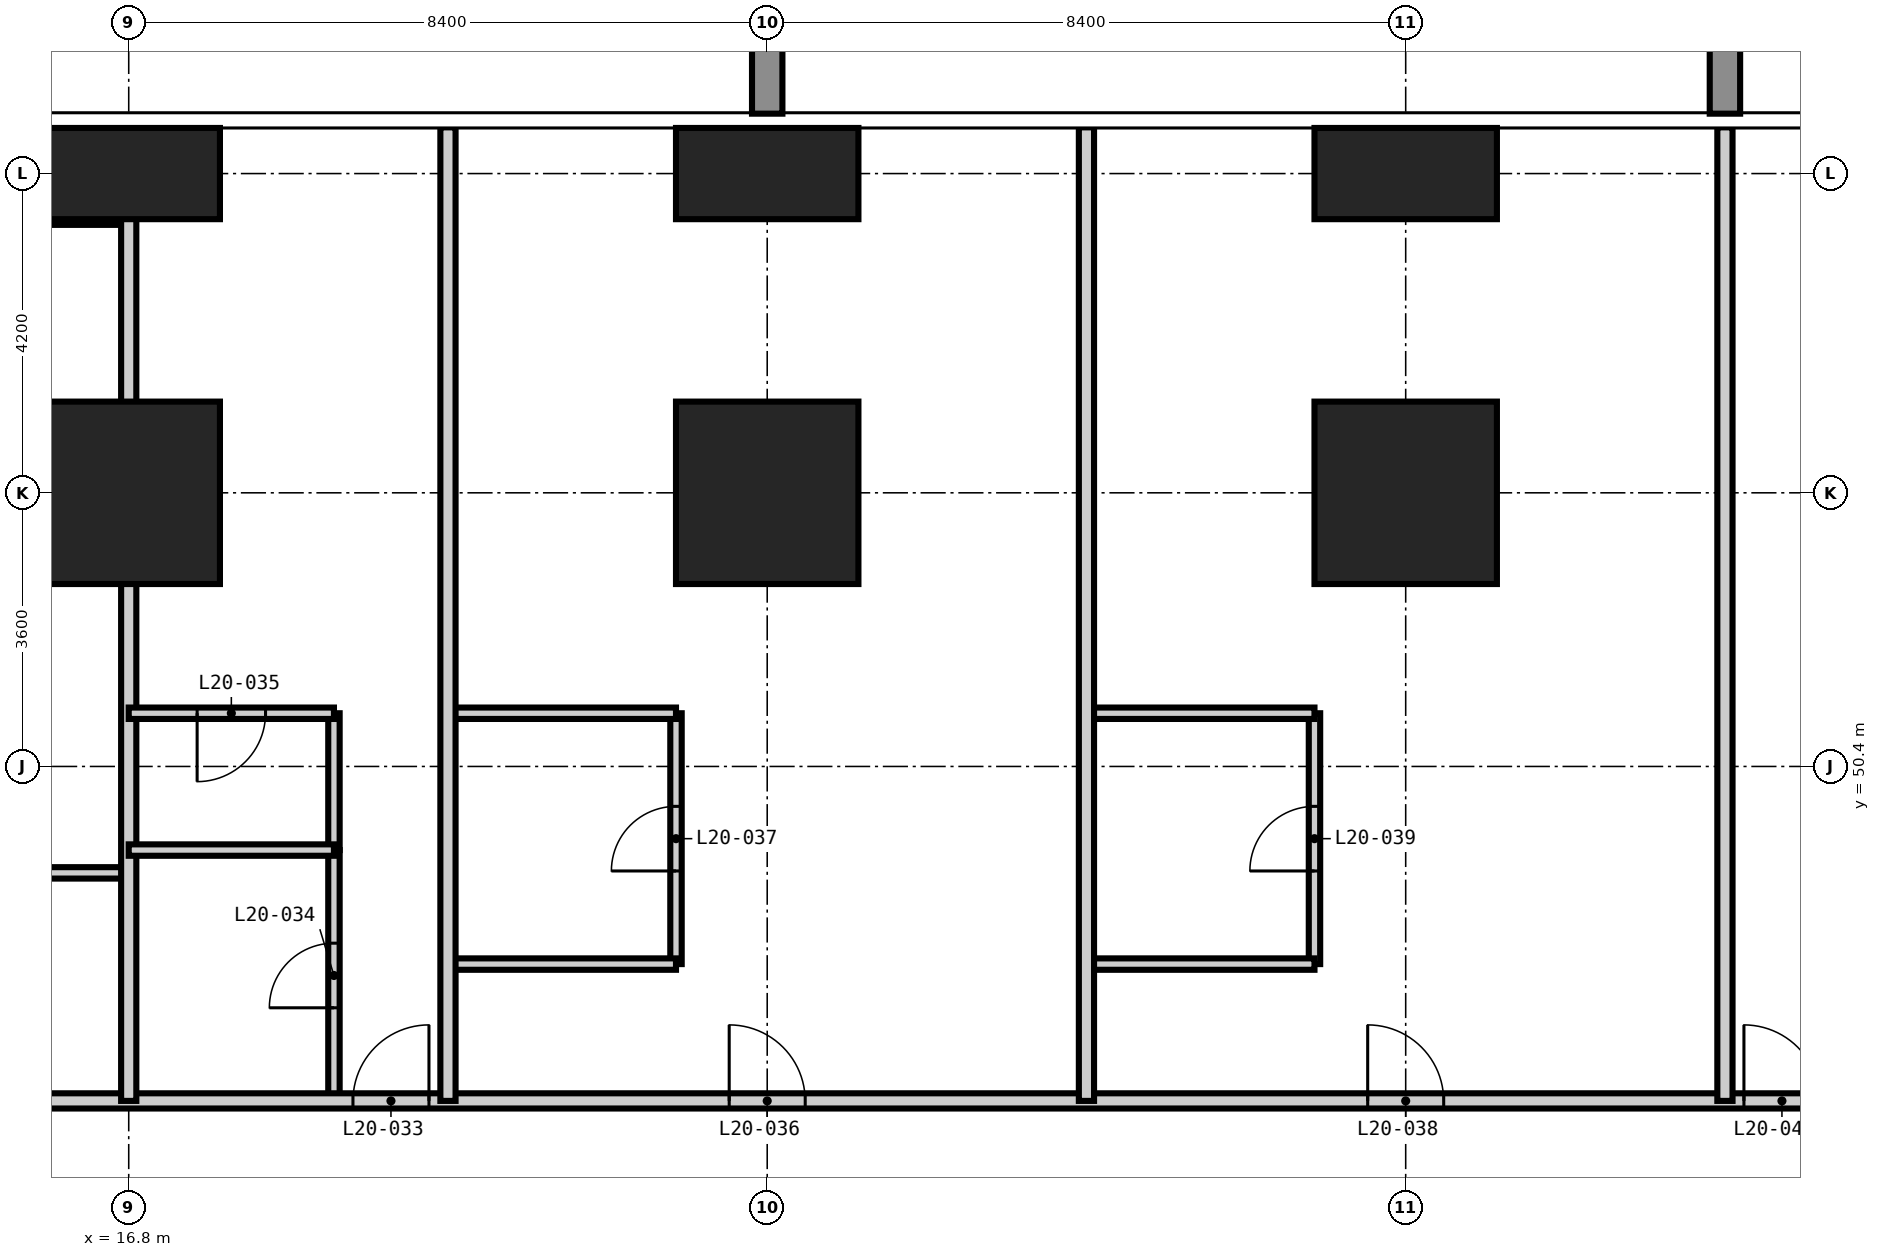
"""IFC4 building model, lengths in metres.
Left out: names, types, materials, properties, quantities, classifications, styles, units other than length and angle.
Written with IfcOpenShell. Run it as: python <this file> out.ifc"""

import sys

from ifc_helpers import new_model, si_unit, direction, frame, frame_2d, origin, origin_2d, place, context, subcontext, project, spatial, rectangle, extrude, element, fill, save


model = new_model("IFC4")
c1 = context("Model", 3, precision=1e-05, world=origin(), true_north=direction((0.0, 1.0)))
c2 = subcontext(c1, "Body", "Model", "MODEL_VIEW")
j1 = project(units=[si_unit("LENGTHUNIT", "METRE"), si_unit("PLANEANGLEUNIT", "RADIAN")], contexts=[c1])
p1 = place(None, origin())
s1 = spatial("IfcSite", under=j1, at=p1, CompositionType="ELEMENT")
p2 = place(p1, origin())
s2 = spatial("IfcBuilding", under=s1, at=p2, CompositionType="ELEMENT")
p3 = place(p2, frame((0.0, 0.0, 81.0)))
s3 = spatial("IfcBuildingStorey", under=s2, at=p3, CompositionType="ELEMENT", Elevation=81.0)
p4 = place(p3, frame((16.8, 54.0, -0.35), z_axis=(0.0, 0.0, 1.0), x_axis=(1.0, 0.0, 0.0)))
e1 = element("IfcColumn", 1, at=p4, inside=s3, PredefinedType="COLUMN", context=c2, shape_type="SweptSolid", body=[
    extrude(rectangle(XDim=2.4, YDim=2.4, at=origin_2d()), origin(), (0.0, 0.0, 1.0), 3.6),
])
p5 = place(p3, frame((16.8, 58.2, -0.35), z_axis=(0.0, 0.0, 1.0), x_axis=(1.0, 0.0, 0.0)))
e2 = element("IfcColumn", 2, at=p5, inside=s3, PredefinedType="COLUMN", context=c2, shape_type="SweptSolid", body=[
    extrude(rectangle(XDim=2.4, YDim=1.2, at=origin_2d()), origin(), (0.0, 0.0, 1.0), 3.6),
])
p6 = place(p3, frame((25.2, 54.0, -0.35), z_axis=(0.0, 0.0, 1.0), x_axis=(1.0, 0.0, 0.0)))
e3 = element("IfcColumn", 3, at=p6, inside=s3, PredefinedType="COLUMN", context=c2, shape_type="SweptSolid", body=[
    extrude(rectangle(XDim=2.4, YDim=2.4, at=origin_2d()), origin(), (0.0, 0.0, 1.0), 3.6),
])
p7 = place(p3, frame((25.2, 58.2, -0.35), z_axis=(0.0, 0.0, 1.0), x_axis=(1.0, 0.0, 0.0)))
e4 = element("IfcColumn", 4, at=p7, inside=s3, PredefinedType="COLUMN", context=c2, shape_type="SweptSolid", body=[
    extrude(rectangle(XDim=2.4, YDim=1.2, at=origin_2d()), origin(), (0.0, 0.0, 1.0), 3.6),
])
p8 = place(p3, frame((33.6, 54.0, -0.35), z_axis=(0.0, 0.0, 1.0), x_axis=(1.0, 0.0, 0.0)))
e5 = element("IfcColumn", 5, at=p8, inside=s3, PredefinedType="COLUMN", context=c2, shape_type="SweptSolid", body=[
    extrude(rectangle(XDim=2.4, YDim=2.4, at=origin_2d()), origin(), (0.0, 0.0, 1.0), 3.6),
])
p9 = place(p3, frame((33.6, 58.2, -0.35), z_axis=(0.0, 0.0, 1.0), x_axis=(1.0, 0.0, 0.0)))
e6 = element("IfcColumn", 6, at=p9, inside=s3, PredefinedType="COLUMN", context=c2, shape_type="SweptSolid", body=[
    extrude(rectangle(XDim=2.4, YDim=1.2, at=origin_2d()), origin(), (0.0, 0.0, 1.0), 3.6),
])
p10 = place(p3, frame((19.5, 46.0, 0.0), z_axis=(0.0, 0.0, 1.0), x_axis=(0.0, 1.0, 0.0)))
e7 = element("IfcWall", 7, at=p10, inside=s3, PredefinedType="PARTITIONING", context=c2, shape_type="SweptSolid", body=[
    extrude(rectangle(XDim=3.3, YDim=0.15, at=frame_2d((1.65, 0.0))), origin(), (0.0, 0.0, 1.0), 3.25),
])
p11 = place(p10, frame((1.225, 0.0, 0.0)))
e8 = element("IfcOpeningElement", 8, at=p11, cuts=e7, PredefinedType="OPENING", context=c2, shape_type="SweptSolid", body=[
    extrude(rectangle(XDim=0.85, YDim=2.1, at=frame_2d((0.425, 1.05))), frame((0.0, 0.085, 0.0), z_axis=(0.0, -1.0, 0.0), x_axis=(1.0, 0.0, 0.0)), (0.0, 0.0, 1.0), 0.17),
])
p12 = place(p3, frame((24.0, 47.8, 0.0), z_axis=(0.0, 0.0, 1.0), x_axis=(0.0, 1.0, 0.0)))
e9 = element("IfcWall", 9, at=p12, inside=s3, PredefinedType="PARTITIONING", context=c2, shape_type="SweptSolid", body=[
    extrude(rectangle(XDim=3.3, YDim=0.15, at=frame_2d((1.65, 0.0))), origin(), (0.0, 0.0, 1.0), 3.25),
])
p13 = place(p12, frame((1.225, 0.0, 0.0)))
e10 = element("IfcOpeningElement", 10, at=p13, cuts=e9, PredefinedType="OPENING", context=c2, shape_type="SweptSolid", body=[
    extrude(rectangle(XDim=0.85, YDim=2.1, at=frame_2d((0.425, 1.05))), frame((0.0, 0.085, 0.0), z_axis=(0.0, -1.0, 0.0), x_axis=(1.0, 0.0, 0.0)), (0.0, 0.0, 1.0), 0.17),
])
p14 = place(p3, frame((32.4, 47.8, 0.0), z_axis=(0.0, 0.0, 1.0), x_axis=(0.0, 1.0, 0.0)))
e11 = element("IfcWall", 11, at=p14, inside=s3, PredefinedType="PARTITIONING", context=c2, shape_type="SweptSolid", body=[
    extrude(rectangle(XDim=3.3, YDim=0.15, at=frame_2d((1.65, 0.0))), origin(), (0.0, 0.0, 1.0), 3.25),
])
p15 = place(p14, frame((1.225, 0.0, 0.0)))
e12 = element("IfcOpeningElement", 12, at=p15, cuts=e11, PredefinedType="OPENING", context=c2, shape_type="SweptSolid", body=[
    extrude(rectangle(XDim=0.85, YDim=2.1, at=frame_2d((0.425, 1.05))), frame((0.0, 0.085, 0.0), z_axis=(0.0, -1.0, 0.0), x_axis=(1.0, 0.0, 0.0)), (0.0, 0.0, 1.0), 0.17),
])
for number, where, z_axis, x_axis in (
    (13, (21.0, 47.8, 0.0), (0.0, 0.0, 1.0), (1.0, 0.0, 0.0)),
    (14, (29.4, 47.8, 0.0), (0.0, 0.0, 1.0), (1.0, 0.0, 0.0)),
):
    element("IfcWall", number, at=place(p3, frame(where, z_axis=z_axis, x_axis=x_axis)), inside=s3, PredefinedType="PARTITIONING", context=c2, shape_type="SweptSolid", body=[
        extrude(rectangle(XDim=3.0, YDim=0.15, at=frame_2d((1.5, 0.0))), origin(), (0.0, 0.0, 1.0), 3.25),
    ])
p16 = place(p3, frame((14.0, 49.0, 0.0), z_axis=(0.0, 0.0, 1.0), x_axis=(1.0, 0.0, 0.0)))
e15 = element("IfcWall", 15, at=p16, inside=s3, PredefinedType="PARTITIONING", context=c2, shape_type="SweptSolid", body=[
    extrude(rectangle(XDim=2.8, YDim=0.15, at=frame_2d((1.4, 0.0))), origin(), (0.0, 0.0, 1.0), 3.25),
])
for number, where, z_axis, x_axis in (
    (16, (21.0, 51.1, 0.0), (0.0, 0.0, 1.0), (1.0, 0.0, 0.0)),
    (17, (29.4, 51.1, 0.0), (0.0, 0.0, 1.0), (1.0, 0.0, 0.0)),
):
    element("IfcWall", number, at=place(p3, frame(where, z_axis=z_axis, x_axis=x_axis)), inside=s3, PredefinedType="PARTITIONING", context=c2, shape_type="SweptSolid", body=[
        extrude(rectangle(XDim=3.0, YDim=0.15, at=frame_2d((1.5, 0.0))), origin(), (0.0, 0.0, 1.0), 3.25),
    ])
p17 = place(p3, frame((13.2, 57.6, 0.0), z_axis=(0.0, 0.0, 1.0), x_axis=(1.0, 0.0, 0.0)))
e18 = element("IfcWall", 18, at=p17, inside=s3, PredefinedType="PARTITIONING", context=c2, shape_type="SweptSolid", body=[
    extrude(rectangle(XDim=3.6, YDim=0.15, at=frame_2d((1.8, 0.0))), origin(), (0.0, 0.0, 1.0), 3.25),
])
p18 = place(p17, frame((1.375, 0.0, 0.0)))
e19 = element("IfcOpeningElement", 19, at=p18, cuts=e18, PredefinedType="OPENING", context=c2, shape_type="SweptSolid", body=[
    extrude(rectangle(XDim=0.85, YDim=2.1, at=frame_2d((0.425, 1.05))), frame((0.0, 0.085, 0.0), z_axis=(0.0, -1.0, 0.0), x_axis=(1.0, 0.0, 0.0)), (0.0, 0.0, 1.0), 0.17),
])
p19 = place(p3, frame((14.0, 46.0, 0.0), z_axis=(0.0, 0.0, 1.0), x_axis=(1.0, 0.0, 0.0)))
e20 = element("IfcWall", 20, at=p19, inside=s3, PredefinedType="PARTITIONING", context=c2, shape_type="SweptSolid", body=[
    extrude(rectangle(XDim=31.4, YDim=0.2, at=frame_2d((15.7, 0.0))), origin(), (0.0, 0.0, 1.0), 3.25),
])
p20 = place(p19, frame((5.75, 0.0, 0.0)))
e21 = element("IfcOpeningElement", 21, at=p20, cuts=e20, PredefinedType="OPENING", context=c2, shape_type="SweptSolid", body=[
    extrude(rectangle(XDim=1.0, YDim=2.2, at=frame_2d((0.5, 1.1))), frame((0.0, 0.11, 0.0), z_axis=(0.0, -1.0, 0.0), x_axis=(1.0, 0.0, 0.0)), (0.0, 0.0, 1.0), 0.22),
])
p21 = place(p19, frame((10.7, 0.0, 0.0)))
e22 = element("IfcOpeningElement", 22, at=p21, cuts=e20, PredefinedType="OPENING", context=c2, shape_type="SweptSolid", body=[
    extrude(rectangle(XDim=1.0, YDim=2.2, at=frame_2d((0.5, 1.1))), frame((0.0, 0.11, 0.0), z_axis=(0.0, -1.0, 0.0), x_axis=(1.0, 0.0, 0.0)), (0.0, 0.0, 1.0), 0.22),
])
p22 = place(p19, frame((19.1, 0.0, 0.0)))
e23 = element("IfcOpeningElement", 23, at=p22, cuts=e20, PredefinedType="OPENING", context=c2, shape_type="SweptSolid", body=[
    extrude(rectangle(XDim=1.0, YDim=2.2, at=frame_2d((0.5, 1.1))), frame((0.0, 0.11, 0.0), z_axis=(0.0, -1.0, 0.0), x_axis=(1.0, 0.0, 0.0)), (0.0, 0.0, 1.0), 0.22),
])
p23 = place(p19, frame((24.05, 0.0, 0.0)))
e24 = element("IfcOpeningElement", 24, at=p23, cuts=e20, PredefinedType="OPENING", context=c2, shape_type="SweptSolid", body=[
    extrude(rectangle(XDim=1.0, YDim=2.2, at=frame_2d((0.5, 1.1))), frame((0.0, 0.11, 0.0), z_axis=(0.0, -1.0, 0.0), x_axis=(1.0, 0.0, 0.0)), (0.0, 0.0, 1.0), 0.22),
])
for number, where, z_axis, x_axis in (
    (25, (16.8, 46.0, 0.0), (0.0, 0.0, 1.0), (0.0, 1.0, 0.0)),
    (26, (21.0, 46.0, 0.0), (0.0, 0.0, 1.0), (0.0, 1.0, 0.0)),
    (27, (29.4, 46.0, 0.0), (0.0, 0.0, 1.0), (0.0, 1.0, 0.0)),
    (28, (37.8, 46.0, 0.0), (0.0, 0.0, 1.0), (0.0, 1.0, 0.0)),
):
    element("IfcWall", number, at=place(p3, frame(where, z_axis=z_axis, x_axis=x_axis)), inside=s3, PredefinedType="PARTITIONING", context=c2, shape_type="SweptSolid", body=[
        extrude(rectangle(XDim=12.808, YDim=0.2, at=frame_2d((6.404, 0.0))), origin(), (0.0, 0.0, 1.0), 3.25),
    ])
p24 = place(p3, frame((19.5, 49.3, 0.0), z_axis=(0.0, 0.0, 1.0), x_axis=(0.0, 1.0, 0.0)))
e29 = element("IfcWall", 29, at=p24, inside=s3, PredefinedType="PARTITIONING", context=c2, shape_type="SweptSolid", body=[
    extrude(rectangle(XDim=1.8, YDim=0.15, at=frame_2d((0.9, 0.0))), origin(), (0.0, 0.0, 1.0), 3.25),
])
p25 = place(p3, frame((16.8, 49.3, 0.0), z_axis=(0.0, 0.0, 1.0), x_axis=(1.0, 0.0, 0.0)))
e30 = element("IfcWall", 30, at=p25, inside=s3, PredefinedType="PARTITIONING", context=c2, shape_type="SweptSolid", body=[
    extrude(rectangle(XDim=2.7, YDim=0.15, at=frame_2d((1.35, 0.0))), origin(), (0.0, 0.0, 1.0), 3.25),
])
p26 = place(p3, frame((16.8, 51.1, 0.0), z_axis=(0.0, 0.0, 1.0), x_axis=(1.0, 0.0, 0.0)))
e31 = element("IfcWall", 31, at=p26, inside=s3, PredefinedType="PARTITIONING", context=c2, shape_type="SweptSolid", body=[
    extrude(rectangle(XDim=2.7, YDim=0.15, at=frame_2d((1.35, 0.0))), origin(), (0.0, 0.0, 1.0), 3.25),
])
p27 = place(p26, frame((0.9, 0.0, 0.0)))
e32 = element("IfcOpeningElement", 32, at=p27, cuts=e31, PredefinedType="OPENING", context=c2, shape_type="SweptSolid", body=[
    extrude(rectangle(XDim=0.9, YDim=2.1, at=frame_2d((0.45, 1.05))), frame((0.0, 0.085, 0.0), z_axis=(0.0, -1.0, 0.0), x_axis=(1.0, 0.0, 0.0)), (0.0, 0.0, 1.0), 0.17),
])
p28 = place(p3, frame((-0.008, 54.6, 0.0), z_axis=(0.0, 0.0, 1.0), x_axis=(1.0, 0.0, 0.0)))
e33 = element("IfcWall", 33, at=p28, inside=s3, PredefinedType="PARTITIONING", context=c2, shape_type="SweptSolid", body=[
    extrude(rectangle(XDim=16.808, YDim=0.15, at=frame_2d((8.404, 0.0))), origin(), (0.0, 0.0, 1.0), 3.25),
])
p29 = place(p28, frame((4.958, 0.0, 0.0)))
e34 = element("IfcOpeningElement", 34, at=p29, cuts=e33, PredefinedType="OPENING", context=c2, shape_type="SweptSolid", body=[
    extrude(rectangle(XDim=0.9, YDim=2.1, at=frame_2d((0.45, 1.05))), frame((0.0, 0.085, 0.0), z_axis=(0.0, -1.0, 0.0), x_axis=(1.0, 0.0, 0.0)), (0.0, 0.0, 1.0), 0.17),
])
p30 = place(p20, origin())
e35 = element("IfcDoor", 35, at=p30, inside=s3, OperationType="SINGLE_SWING_RIGHT", PredefinedType="DOOR", context=c2, shape_type="SweptSolid", body=[
    extrude(rectangle(XDim=1.0, YDim=2.2, at=frame_2d((0.5, 1.1))), frame((0.0, 0.025, 0.0), z_axis=(0.0, -1.0, 0.0), x_axis=(1.0, 0.0, 0.0)), (0.0, 0.0, 1.0), 0.05),
])
fill(e21, e35)
p31 = place(p11, origin())
e36 = element("IfcDoor", 36, at=p31, inside=s3, OperationType="SINGLE_SWING_LEFT", PredefinedType="DOOR", context=c2, shape_type="SweptSolid", body=[
    extrude(rectangle(XDim=0.85, YDim=2.1, at=frame_2d((0.425, 1.05))), frame((0.0, 0.025, 0.0), z_axis=(0.0, -1.0, 0.0), x_axis=(1.0, 0.0, 0.0)), (0.0, 0.0, 1.0), 0.05),
])
fill(e8, e36)
p32 = place(p27, frame((0.9, 0.0, 0.0), z_axis=(0.0, 0.0, 1.0), x_axis=(-1.0, 0.0, 0.0)))
e37 = element("IfcDoor", 37, at=p32, inside=s3, OperationType="SINGLE_SWING_RIGHT", PredefinedType="DOOR", context=c2, shape_type="SweptSolid", body=[
    extrude(rectangle(XDim=0.9, YDim=2.1, at=frame_2d((0.45, 1.05))), frame((0.0, 0.025, 0.0), z_axis=(0.0, -1.0, 0.0), x_axis=(1.0, 0.0, 0.0)), (0.0, 0.0, 1.0), 0.05),
])
fill(e32, e37)
p33 = place(p21, origin())
e38 = element("IfcDoor", 38, at=p33, inside=s3, OperationType="SINGLE_SWING_LEFT", PredefinedType="DOOR", context=c2, shape_type="SweptSolid", body=[
    extrude(rectangle(XDim=1.0, YDim=2.2, at=frame_2d((0.5, 1.1))), frame((0.0, 0.025, 0.0), z_axis=(0.0, -1.0, 0.0), x_axis=(1.0, 0.0, 0.0)), (0.0, 0.0, 1.0), 0.05),
])
fill(e22, e38)
p34 = place(p13, origin())
e39 = element("IfcDoor", 39, at=p34, inside=s3, OperationType="SINGLE_SWING_LEFT", PredefinedType="DOOR", context=c2, shape_type="SweptSolid", body=[
    extrude(rectangle(XDim=0.85, YDim=2.1, at=frame_2d((0.425, 1.05))), frame((0.0, 0.025, 0.0), z_axis=(0.0, -1.0, 0.0), x_axis=(1.0, 0.0, 0.0)), (0.0, 0.0, 1.0), 0.05),
])
fill(e10, e39)
p35 = place(p22, origin())
e40 = element("IfcDoor", 40, at=p35, inside=s3, OperationType="SINGLE_SWING_LEFT", PredefinedType="DOOR", context=c2, shape_type="SweptSolid", body=[
    extrude(rectangle(XDim=1.0, YDim=2.2, at=frame_2d((0.5, 1.1))), frame((0.0, 0.025, 0.0), z_axis=(0.0, -1.0, 0.0), x_axis=(1.0, 0.0, 0.0)), (0.0, 0.0, 1.0), 0.05),
])
fill(e23, e40)
p36 = place(p15, origin())
e41 = element("IfcDoor", 41, at=p36, inside=s3, OperationType="SINGLE_SWING_LEFT", PredefinedType="DOOR", context=c2, shape_type="SweptSolid", body=[
    extrude(rectangle(XDim=0.85, YDim=2.1, at=frame_2d((0.425, 1.05))), frame((0.0, 0.025, 0.0), z_axis=(0.0, -1.0, 0.0), x_axis=(1.0, 0.0, 0.0)), (0.0, 0.0, 1.0), 0.05),
])
fill(e12, e41)
p37 = place(p23, origin())
e42 = element("IfcDoor", 42, at=p37, inside=s3, OperationType="SINGLE_SWING_LEFT", PredefinedType="DOOR", context=c2, shape_type="SweptSolid", body=[
    extrude(rectangle(XDim=1.0, YDim=2.2, at=frame_2d((0.5, 1.1))), frame((0.0, 0.025, 0.0), z_axis=(0.0, -1.0, 0.0), x_axis=(1.0, 0.0, 0.0)), (0.0, 0.0, 1.0), 0.05),
])
fill(e24, e42)
save(model, sys.argv[1])
